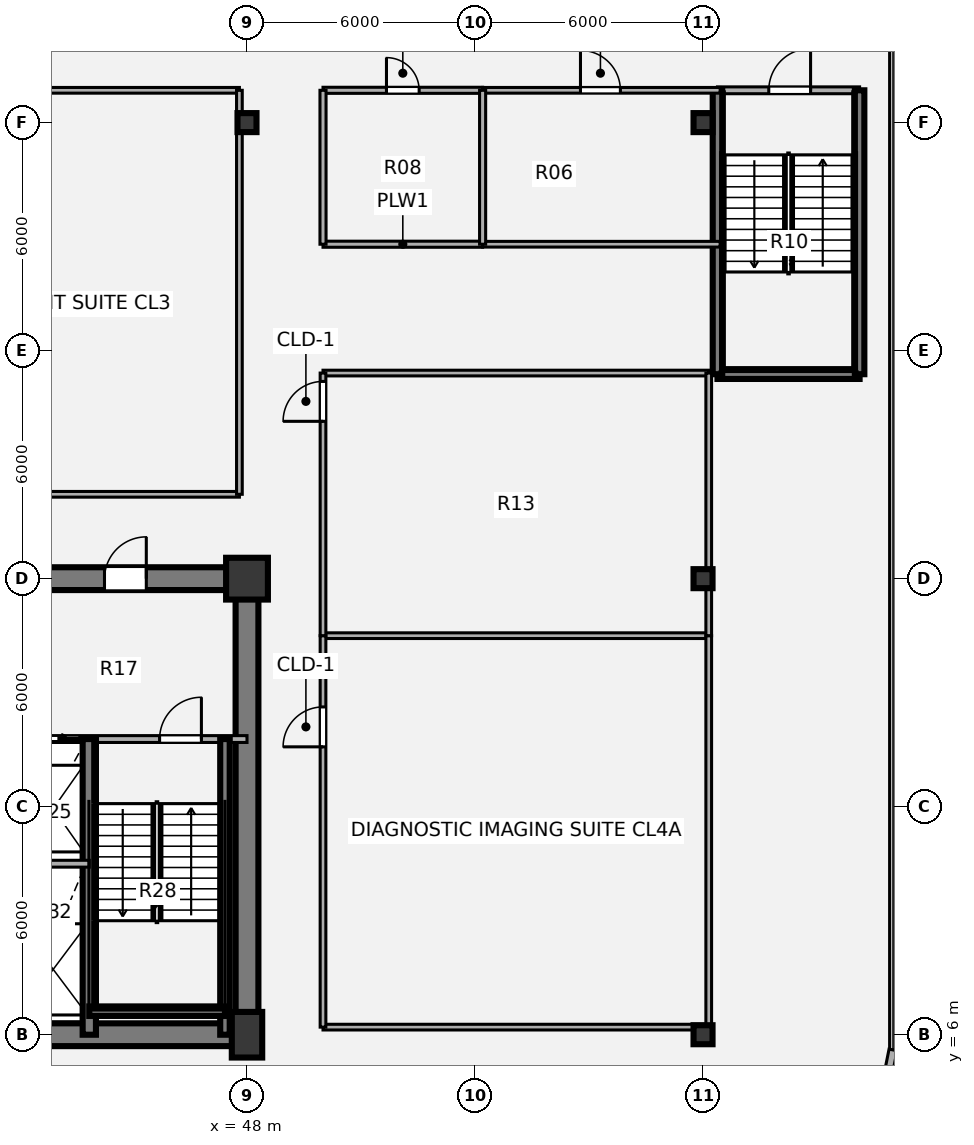
"""IFC4 building model, lengths in metres.
Left out: names, types, materials, properties, quantities, classifications, styles, units other than length and angle.
Written with IfcOpenShell. Run it as: python <this file> out.ifc"""

import sys

from ifc_helpers import new_model, si_unit, direction, frame, frame_2d, origin, origin_2d, place, context, subcontext, project, spatial, rectangle, i_section, extrude, source, transform, mapped, element, fill, save


model = new_model("IFC4")
c1 = context("Model", 3, precision=1e-05, world=origin(), true_north=direction((0.0, 1.0)))
c2 = subcontext(c1, "Body", "Model", "MODEL_VIEW")
j1 = project(units=[si_unit("LENGTHUNIT", "METRE"), si_unit("PLANEANGLEUNIT", "RADIAN")], contexts=[c1])
p1 = place(None, origin())
s1 = spatial("IfcSite", under=j1, at=p1, CompositionType="ELEMENT")
p2 = place(p1, origin())
s2 = spatial("IfcBuilding", under=s1, at=p2, CompositionType="ELEMENT")
p3 = place(p2, frame((0.0, 0.0, 9.72)))
s3 = spatial("IfcBuildingStorey", under=s2, at=p3, CompositionType="ELEMENT", Elevation=9.72)
m1 = source(origin(), c2, "Body", "SweptSolid", [
    extrude(rectangle(XDim=0.8, YDim=1.2, at=origin_2d()), origin(), (0.0, 0.0, 1.0), 4.32),
])
p4 = place(p3, frame((48.0, 6.0, 0.0), z_axis=(0.0, 0.0, 1.0), x_axis=(1.0, 0.0, 0.0)))
e1 = element("IfcColumn", 1, at=p4, inside=s3, PredefinedType="COLUMN", context=c2, shape_type="MappedRepresentation", body=[
    mapped(m1, transform((0.0, 0.0, 0.0), x_axis=(1.0, 0.0, 0.0), y_axis=(0.0, 1.0, 0.0), z_axis=(0.0, 0.0, 1.0), scale=1.0)),
])
m2 = source(origin(), c2, "Body", "SweptSolid", [
    extrude(rectangle(XDim=1.1, YDim=1.1, at=origin_2d()), origin(), (0.0, 0.0, 1.0), 4.32),
])
p5 = place(p3, frame((48.0, 18.0, 0.0), z_axis=(0.0, 0.0, 1.0), x_axis=(1.0, 0.0, 0.0)))
e2 = element("IfcColumn", 2, at=p5, inside=s3, PredefinedType="COLUMN", context=c2, shape_type="MappedRepresentation", body=[
    mapped(m2, transform((0.0, 0.0, 0.0), x_axis=(1.0, 0.0, 0.0), y_axis=(0.0, 1.0, 0.0), z_axis=(0.0, 0.0, 1.0), scale=1.0)),
])
p6 = place(p3, frame((48.3, 6.0, 0.0), z_axis=(0.0, 0.0, 1.0), x_axis=(-1.0, 0.0, 0.0)))
e3 = element("IfcWall", 3, at=p6, inside=s3, PredefinedType="SHEAR", context=c2, shape_type="SweptSolid", body=[
    extrude(rectangle(XDim=24.6, YDim=0.6, at=frame_2d((12.3, 0.0))), origin(), (0.0, 0.0, 1.0), 4.32),
])
p7 = place(p3, frame((48.0, 18.0, 0.0), z_axis=(0.0, 0.0, 1.0), x_axis=(0.0, -1.0, 0.0)))
e4 = element("IfcWall", 4, at=p7, inside=s3, PredefinedType="SHEAR", context=c2, shape_type="SweptSolid", body=[
    extrude(rectangle(XDim=12.0, YDim=0.6, at=frame_2d((6.0, 0.0))), origin(), (0.0, 0.0, 1.0), 4.32),
])
p8 = place(p3, frame((38.8, 18.0, 0.0), z_axis=(0.0, 0.0, 1.0), x_axis=(1.0, 0.0, 0.0)))
e5 = element("IfcWall", 5, at=p8, inside=s3, PredefinedType="SHEAR", context=c2, shape_type="SweptSolid", body=[
    extrude(rectangle(XDim=9.5, YDim=0.6, at=frame_2d((4.75, 0.0))), origin(), (0.0, 0.0, 1.0), 4.32),
])
p9 = place(p8, frame((5.45, 0.0, 0.0)))
e6 = element("IfcOpeningElement", 6, at=p9, cuts=e5, PredefinedType="OPENING", context=c2, shape_type="SweptSolid", body=[
    extrude(rectangle(XDim=1.1, YDim=2.1, at=origin_2d()), frame((0.55, 0.31, 1.05), z_axis=(0.0, -1.0, 0.0), x_axis=(1.0, 0.0, 0.0)), (0.0, 0.0, 1.0), 0.62),
])
m3 = source(origin(), c2, "Body", "SweptSolid", [
    extrude(i_section(OverallWidth=0.5, OverallDepth=0.5, WebThickness=0.022, FlangeThickness=0.035, at=origin_2d()), origin(), (0.0, 0.0, 1.0), 4.32),
])
for number, where, z_axis, x_axis in (
    (7, (60.0, 6.0, 0.0), (0.0, 0.0, 1.0), (1.0, 0.0, 0.0)),
    (8, (60.0, 18.0, 0.0), (0.0, 0.0, 1.0), (1.0, 0.0, 0.0)),
    (9, (48.0, 30.0, 0.0), (0.0, 0.0, 1.0), (1.0, 0.0, 0.0)),
    (10, (60.0, 30.0, 0.0), (0.0, 0.0, 1.0), (1.0, 0.0, 0.0)),
):
    element("IfcColumn", number, at=place(p3, frame(where, z_axis=z_axis, x_axis=x_axis)), inside=s3, PredefinedType="COLUMN", context=c2, shape_type="MappedRepresentation", body=[
        mapped(m3, transform((0.0, 0.0, 0.0), x_axis=(1.0, 0.0, 0.0), y_axis=(0.0, 1.0, 0.0), z_axis=(0.0, 0.0, 1.0), scale=1.0)),
    ])
p10 = place(p3, frame((65.0, 5.6, 0.0), z_axis=(0.0, 0.0, 1.0), x_axis=(-0.195138390419, -0.980775717779, 0.0)))
e11 = element("IfcWall", 11, at=p10, inside=s3, PredefinedType="SOLIDWALL", context=c2, shape_type="SweptSolid", body=[
    extrude(rectangle(XDim=1.249, YDim=0.215, at=frame_2d((0.624, 0.0))), origin(), (0.0, 0.0, 1.0), 4.04),
])
p11 = place(p3, frame((60.38, 30.85, 0.0), z_axis=(0.0, 0.0, 1.0), x_axis=(1.0, 0.0, 0.0)))
e12 = element("IfcWall", 12, at=p11, inside=s3, PredefinedType="PARTITIONING", context=c2, shape_type="SweptSolid", body=[
    extrude(rectangle(XDim=3.74, YDim=0.18, at=frame_2d((1.87, 0.0))), origin(), (0.0, 0.0, 1.0), 4.04),
])
p12 = place(p11, frame((1.35, 0.0, 0.0)))
e13 = element("IfcOpeningElement", 13, at=p12, cuts=e12, PredefinedType="OPENING", context=c2, shape_type="SweptSolid", body=[
    extrude(rectangle(XDim=1.1, YDim=2.1, at=origin_2d()), frame((0.55, 0.1, 1.05), z_axis=(0.0, -1.0, 0.0), x_axis=(1.0, 0.0, 0.0)), (0.0, 0.0, 1.0), 0.2),
])
p13 = place(p3, frame((60.38, 23.38, 0.0), z_axis=(0.0, 0.0, 1.0), x_axis=(1.0, 0.0, 0.0)))
e14 = element("IfcWall", 14, at=p13, inside=s3, PredefinedType="SHEAR", context=c2, shape_type="SweptSolid", body=[
    extrude(rectangle(XDim=3.74, YDim=0.25, at=frame_2d((1.87, 0.0))), origin(), (0.0, 0.0, 1.0), 4.32),
])
for number, where, z_axis, x_axis in (
    (15, (60.38, 23.38, 0.0), (0.0, 0.0, 1.0), (0.0, 1.0, 0.0)),
    (16, (64.12, 23.38, 0.0), (0.0, 0.0, 1.0), (0.0, 1.0, 0.0)),
):
    element("IfcWall", number, at=place(p3, frame(where, z_axis=z_axis, x_axis=x_axis)), inside=s3, PredefinedType="SHEAR", context=c2, shape_type="SweptSolid", body=[
        extrude(rectangle(XDim=7.47, YDim=0.25, at=frame_2d((3.735, 0.0))), origin(), (0.0, 0.0, 1.0), 4.32),
    ])
p14 = place(p3, frame((41.9, 13.78, 0.0), z_axis=(0.0, 0.0, 1.0), x_axis=(1.0, 0.0, 0.0)))
e17 = element("IfcWall", 17, at=p14, inside=s3, PredefinedType="PARTITIONING", context=c2, shape_type="SweptSolid", body=[
    extrude(rectangle(XDim=6.1, YDim=0.18, at=frame_2d((3.05, 0.0))), origin(), (0.0, 0.0, 1.0), 4.01),
])
p15 = place(p14, frame((0.6, 0.0, 0.0)))
e18 = element("IfcOpeningElement", 18, at=p15, cuts=e17, PredefinedType="OPENING", context=c2, shape_type="SweptSolid", body=[
    extrude(rectangle(XDim=1.1, YDim=2.1, at=origin_2d()), frame((0.55, 0.1, 1.05), z_axis=(0.0, -1.0, 0.0), x_axis=(1.0, 0.0, 0.0)), (0.0, 0.0, 1.0), 0.2),
])
p16 = place(p14, frame((3.8, 0.0, 0.0)))
e19 = element("IfcOpeningElement", 19, at=p16, cuts=e17, PredefinedType="OPENING", context=c2, shape_type="SweptSolid", body=[
    extrude(rectangle(XDim=1.1, YDim=2.1, at=origin_2d()), frame((0.55, 0.1, 1.05), z_axis=(0.0, -1.0, 0.0), x_axis=(1.0, 0.0, 0.0)), (0.0, 0.0, 1.0), 0.2),
])
p17 = place(p3, frame((43.85, 6.0, 0.0), z_axis=(0.0, 0.0, 1.0), x_axis=(0.0, 1.0, 0.0)))
e20 = element("IfcWall", 20, at=p17, inside=s3, PredefinedType="SHEAR", context=c2, shape_type="SweptSolid", body=[
    extrude(rectangle(XDim=7.78, YDim=0.35, at=frame_2d((3.89, 0.0))), origin(), (0.0, 0.0, 1.0), 4.36),
])
p18 = place(p3, frame((47.42, 6.0, 0.0), z_axis=(0.0, 0.0, 1.0), x_axis=(0.0, 1.0, 0.0)))
e21 = element("IfcWall", 21, at=p18, inside=s3, PredefinedType="SHEAR", context=c2, shape_type="SweptSolid", body=[
    extrude(rectangle(XDim=7.78, YDim=0.25, at=frame_2d((3.89, 0.0))), origin(), (0.0, 0.0, 1.0), 4.36),
])
p19 = place(p3, frame((43.85, 6.62, 0.0), z_axis=(0.0, 0.0, 1.0), x_axis=(1.0, 0.0, 0.0)))
e22 = element("IfcWall", 22, at=p19, inside=s3, PredefinedType="SHEAR", context=c2, shape_type="SweptSolid", body=[
    extrude(rectangle(XDim=3.57, YDim=0.25, at=frame_2d((1.785, 0.0))), origin(), (0.0, 0.0, 1.0), 4.36),
])
p20 = place(p3, frame((41.9, 10.5, 0.0), z_axis=(0.0, 0.0, 1.0), x_axis=(1.0, 0.0, 0.0)))
e23 = element("IfcWall", 23, at=p20, inside=s3, PredefinedType="PARTITIONING", context=c2, shape_type="SweptSolid", body=[
    extrude(rectangle(XDim=1.95, YDim=0.18, at=frame_2d((0.975, 0.0))), origin(), (0.0, 0.0, 1.0), 4.01),
])
p21 = place(p3, frame((50.0, 6.2, 0.0), z_axis=(0.0, 0.0, 1.0), x_axis=(1.0, 0.0, 0.0)))
e24 = element("IfcWall", 24, at=p21, inside=s3, PredefinedType="PARTITIONING", context=c2, shape_type="SweptSolid", body=[
    extrude(rectangle(XDim=10.15, YDim=0.15, at=frame_2d((5.075, 0.0))), origin(), (0.0, 0.0, 1.0), 3.325),
])
p22 = place(p3, frame((50.0, 16.5, 0.0), z_axis=(0.0, 0.0, 1.0), x_axis=(1.0, 0.0, 0.0)))
e25 = element("IfcWall", 25, at=p22, inside=s3, PredefinedType="PARTITIONING", context=c2, shape_type="SweptSolid", body=[
    extrude(rectangle(XDim=10.15, YDim=0.15, at=frame_2d((5.075, 0.0))), origin(), (0.0, 0.0, 1.0), 4.01),
])
p23 = place(p3, frame((36.0, 20.22, 0.0), z_axis=(0.0, 0.0, 1.0), x_axis=(1.0, 0.0, 0.0)))
e26 = element("IfcWall", 26, at=p23, inside=s3, PredefinedType="PARTITIONING", context=c2, shape_type="SweptSolid", body=[
    extrude(rectangle(XDim=11.8, YDim=0.15, at=frame_2d((5.9, 0.0))), origin(), (0.0, 0.0, 1.0), 4.01),
])
p24 = place(p3, frame((50.0, 23.41, 0.0), z_axis=(0.0, 0.0, 1.0), x_axis=(1.0, 0.0, 0.0)))
e27 = element("IfcWall", 27, at=p24, inside=s3, PredefinedType="PARTITIONING", context=c2, shape_type="SweptSolid", body=[
    extrude(rectangle(XDim=10.15, YDim=0.15, at=frame_2d((5.075, 0.0))), origin(), (0.0, 0.0, 1.0), 4.01),
])
p25 = place(p3, frame((50.0, 26.8, 0.0), z_axis=(0.0, 0.0, 1.0), x_axis=(1.0, 0.0, 0.0)))
e28 = element("IfcWall", 28, at=p25, inside=s3, PredefinedType="PLUMBINGWALL", context=c2, shape_type="SweptSolid", body=[
    extrude(rectangle(XDim=4.2, YDim=0.16, at=frame_2d((2.1, 0.0))), origin(), (0.0, 0.0, 1.0), 4.01),
])
p26 = place(p3, frame((54.2, 26.8, 0.0), z_axis=(0.0, 0.0, 1.0), x_axis=(1.0, 0.0, 0.0)))
e29 = element("IfcWall", 29, at=p26, inside=s3, PredefinedType="PARTITIONING", context=c2, shape_type="SweptSolid", body=[
    extrude(rectangle(XDim=6.25, YDim=0.15, at=frame_2d((3.125, 0.0))), origin(), (0.0, 0.0, 1.0), 4.01),
])
p27 = place(p3, frame((36.0, 30.85, 0.0), z_axis=(0.0, 0.0, 1.0), x_axis=(1.0, 0.0, 0.0)))
e30 = element("IfcWall", 30, at=p27, inside=s3, PredefinedType="PARTITIONING", context=c2, shape_type="SweptSolid", body=[
    extrude(rectangle(XDim=11.8, YDim=0.15, at=frame_2d((5.9, 0.0))), origin(), (0.0, 0.0, 1.0), 4.01),
])
p28 = place(p27, frame((5.475, 0.0, 0.0)))
e31 = element("IfcOpeningElement", 31, at=p28, cuts=e30, PredefinedType="OPENING", context=c2, shape_type="SweptSolid", body=[
    extrude(rectangle(XDim=1.05, YDim=2.1, at=origin_2d()), frame((0.525, 0.085, 1.05), z_axis=(0.0, -1.0, 0.0), x_axis=(1.0, 0.0, 0.0)), (0.0, 0.0, 1.0), 0.17),
])
p29 = place(p3, frame((50.0, 30.85, 0.0), z_axis=(0.0, 0.0, 1.0), x_axis=(1.0, 0.0, 0.0)))
e32 = element("IfcWall", 32, at=p29, inside=s3, PredefinedType="PLUMBINGWALL", context=c2, shape_type="SweptSolid", body=[
    extrude(rectangle(XDim=4.2, YDim=0.16, at=frame_2d((2.1, 0.0))), origin(), (0.0, 0.0, 1.0), 4.01),
])
p30 = place(p29, frame((1.67, 0.0, 0.0)))
e33 = element("IfcOpeningElement", 33, at=p30, cuts=e32, PredefinedType="OPENING", context=c2, shape_type="SweptSolid", body=[
    extrude(rectangle(XDim=0.86, YDim=2.1, at=origin_2d()), frame((0.43, 0.09, 1.05), z_axis=(0.0, -1.0, 0.0), x_axis=(1.0, 0.0, 0.0)), (0.0, 0.0, 1.0), 0.18),
])
p31 = place(p3, frame((54.2, 30.85, 0.0), z_axis=(0.0, 0.0, 1.0), x_axis=(1.0, 0.0, 0.0)))
e34 = element("IfcWall", 34, at=p31, inside=s3, PredefinedType="PARTITIONING", context=c2, shape_type="SweptSolid", body=[
    extrude(rectangle(XDim=6.25, YDim=0.15, at=frame_2d((3.125, 0.0))), origin(), (0.0, 0.0, 1.0), 4.01),
])
p32 = place(p31, frame((2.575, 0.0, 0.0)))
e35 = element("IfcOpeningElement", 35, at=p32, cuts=e34, PredefinedType="OPENING", context=c2, shape_type="SweptSolid", body=[
    extrude(rectangle(XDim=1.05, YDim=2.1, at=origin_2d()), frame((0.525, 0.085, 1.05), z_axis=(0.0, -1.0, 0.0), x_axis=(1.0, 0.0, 0.0)), (0.0, 0.0, 1.0), 0.17),
])
p33 = place(p3, frame((47.8, 20.22, 0.0), z_axis=(0.0, 0.0, 1.0), x_axis=(0.0, 1.0, 0.0)))
e36 = element("IfcWall", 36, at=p33, inside=s3, PredefinedType="PARTITIONING", context=c2, shape_type="SweptSolid", body=[
    extrude(rectangle(XDim=10.63, YDim=0.15, at=frame_2d((5.315, 0.0))), origin(), (0.0, 0.0, 1.0), 3.225),
])
p34 = place(p3, frame((50.0, 6.2, 0.0), z_axis=(0.0, 0.0, 1.0), x_axis=(0.0, 1.0, 0.0)))
e37 = element("IfcWall", 37, at=p34, inside=s3, PredefinedType="PARTITIONING", context=c2, shape_type="SweptSolid", body=[
    extrude(rectangle(XDim=10.3, YDim=0.15, at=frame_2d((5.15, 0.0))), origin(), (0.0, 0.0, 1.0), 3.718),
])
p35 = place(p34, frame((7.375, 0.0, 0.0)))
e38 = element("IfcOpeningElement", 38, at=p35, cuts=e37, PredefinedType="OPENING", context=c2, shape_type="SweptSolid", body=[
    extrude(rectangle(XDim=1.05, YDim=2.1, at=origin_2d()), frame((0.525, 0.085, 1.05), z_axis=(0.0, -1.0, 0.0), x_axis=(1.0, 0.0, 0.0)), (0.0, 0.0, 1.0), 0.17),
])
p36 = place(p3, frame((50.0, 16.5, 0.0), z_axis=(0.0, 0.0, 1.0), x_axis=(0.0, 1.0, 0.0)))
e39 = element("IfcWall", 39, at=p36, inside=s3, PredefinedType="PARTITIONING", context=c2, shape_type="SweptSolid", body=[
    extrude(rectangle(XDim=6.91, YDim=0.15, at=frame_2d((3.455, 0.0))), origin(), (0.0, 0.0, 1.0), 3.718),
])
p37 = place(p36, frame((5.64, 0.0, 0.0)))
e40 = element("IfcOpeningElement", 40, at=p37, cuts=e39, PredefinedType="OPENING", context=c2, shape_type="SweptSolid", body=[
    extrude(rectangle(XDim=1.05, YDim=2.1, at=origin_2d()), frame((0.525, 0.085, 1.05), z_axis=(0.0, -1.0, 0.0), x_axis=(1.0, 0.0, 0.0)), (0.0, 0.0, 1.0), 0.17),
])
for number, where, z_axis, x_axis in (
    (41, (50.0, 26.8, 0.0), (0.0, 0.0, 1.0), (0.0, 1.0, 0.0)),
    (42, (54.2, 26.8, 0.0), (0.0, 0.0, 1.0), (0.0, 1.0, 0.0)),
):
    element("IfcWall", number, at=place(p3, frame(where, z_axis=z_axis, x_axis=x_axis)), inside=s3, PredefinedType="PLUMBINGWALL", context=c2, shape_type="SweptSolid", body=[
        extrude(rectangle(XDim=4.05, YDim=0.16, at=frame_2d((2.025, 0.0))), origin(), (0.0, 0.0, 1.0), 3.666),
    ])
p38 = place(p3, frame((60.15, 6.2, 0.0), z_axis=(0.0, 0.0, 1.0), x_axis=(0.0, 1.0, 0.0)))
e43 = element("IfcWall", 43, at=p38, inside=s3, PredefinedType="PARTITIONING", context=c2, shape_type="SweptSolid", body=[
    extrude(rectangle(XDim=10.3, YDim=0.15, at=frame_2d((5.15, 0.0))), origin(), (0.0, 0.0, 1.0), 3.225),
])
p39 = place(p3, frame((60.15, 16.5, 0.0), z_axis=(0.0, 0.0, 1.0), x_axis=(0.0, 1.0, 0.0)))
e44 = element("IfcWall", 44, at=p39, inside=s3, PredefinedType="PARTITIONING", context=c2, shape_type="SweptSolid", body=[
    extrude(rectangle(XDim=6.91, YDim=0.15, at=frame_2d((3.455, 0.0))), origin(), (0.0, 0.0, 1.0), 3.225),
])
m4 = source(origin(), c2, "Body", "SweptSolid", [
    extrude(rectangle(XDim=1.1, YDim=2.1, at=origin_2d()), frame((0.55, 0.025, 1.05), z_axis=(0.0, -1.0, 0.0), x_axis=(1.0, 0.0, 0.0)), (0.0, 0.0, 1.0), 0.05),
])
p40 = place(p12, origin())
e45 = element("IfcDoor", 45, at=p40, inside=s3, OperationType="SINGLE_SWING_RIGHT", PredefinedType="DOOR", context=c2, shape_type="MappedRepresentation", body=[
    mapped(m4, transform((0.0, 0.0, 0.0), x_axis=(1.0, 0.0, 0.0), y_axis=(0.0, 1.0, 0.0), z_axis=(0.0, 0.0, 1.0), scale=1.0)),
])
fill(e13, e45)
m5 = source(origin(), c2, "Body", "SweptSolid", [
    extrude(rectangle(XDim=1.1, YDim=2.1, at=origin_2d()), frame((0.55, 0.025, 1.05), z_axis=(0.0, -1.0, 0.0), x_axis=(1.0, 0.0, 0.0)), (0.0, 0.0, 1.0), 0.05),
])
p41 = place(p15, origin())
e46 = element("IfcDoor", 46, at=p41, inside=s3, OperationType="SLIDING_TO_RIGHT", PredefinedType="DOOR", context=c2, shape_type="MappedRepresentation", body=[
    mapped(m5, transform((0.0, 0.0, 0.0), x_axis=(1.0, 0.0, 0.0), y_axis=(0.0, 1.0, 0.0), z_axis=(0.0, 0.0, 1.0), scale=1.0)),
])
fill(e18, e46)
p42 = place(p16, origin())
e47 = element("IfcDoor", 47, at=p42, inside=s3, OperationType="SINGLE_SWING_RIGHT", PredefinedType="DOOR", context=c2, shape_type="MappedRepresentation", body=[
    mapped(m4, transform((0.0, 0.0, 0.0), x_axis=(1.0, 0.0, 0.0), y_axis=(0.0, 1.0, 0.0), z_axis=(0.0, 0.0, 1.0), scale=1.0)),
])
fill(e19, e47)
m6 = source(origin(), c2, "Body", "SweptSolid", [
    extrude(rectangle(XDim=1.1, YDim=2.1, at=origin_2d()), frame((0.55, 0.025, 1.05), z_axis=(0.0, -1.0, 0.0), x_axis=(1.0, 0.0, 0.0)), (0.0, 0.0, 1.0), 0.05),
])
p43 = place(p9, origin())
e48 = element("IfcDoor", 48, at=p43, inside=s3, OperationType="SINGLE_SWING_RIGHT", PredefinedType="DOOR", context=c2, shape_type="MappedRepresentation", body=[
    mapped(m6, transform((0.0, 0.0, 0.0), x_axis=(1.0, 0.0, 0.0), y_axis=(0.0, 1.0, 0.0), z_axis=(0.0, 0.0, 1.0), scale=1.0)),
])
fill(e6, e48)
m7 = source(origin(), c2, "Body", "SweptSolid", [
    extrude(rectangle(XDim=0.86, YDim=2.1, at=origin_2d()), frame((0.43, 0.025, 1.05), z_axis=(0.0, -1.0, 0.0), x_axis=(1.0, 0.0, 0.0)), (0.0, 0.0, 1.0), 0.05),
])
p44 = place(p30, origin())
e49 = element("IfcDoor", 49, at=p44, inside=s3, OperationType="SINGLE_SWING_LEFT", PredefinedType="DOOR", context=c2, shape_type="MappedRepresentation", body=[
    mapped(m7, transform((0.0, 0.0, 0.0), x_axis=(1.0, 0.0, 0.0), y_axis=(0.0, 1.0, 0.0), z_axis=(0.0, 0.0, 1.0), scale=1.0)),
])
fill(e33, e49)
m8 = source(origin(), c2, "Body", "SweptSolid", [
    extrude(rectangle(XDim=1.05, YDim=2.1, at=origin_2d()), frame((0.525, 0.025, 1.05), z_axis=(0.0, -1.0, 0.0), x_axis=(1.0, 0.0, 0.0)), (0.0, 0.0, 1.0), 0.05),
])
p45 = place(p32, origin())
e50 = element("IfcDoor", 50, at=p45, inside=s3, OperationType="SINGLE_SWING_LEFT", PredefinedType="DOOR", context=c2, shape_type="MappedRepresentation", body=[
    mapped(m8, transform((0.0, 0.0, 0.0), x_axis=(1.0, 0.0, 0.0), y_axis=(0.0, 1.0, 0.0), z_axis=(0.0, 0.0, 1.0), scale=1.0)),
])
fill(e35, e50)
p46 = place(p35, origin())
e51 = element("IfcDoor", 51, at=p46, inside=s3, OperationType="SINGLE_SWING_LEFT", PredefinedType="DOOR", context=c2, shape_type="MappedRepresentation", body=[
    mapped(m8, transform((0.0, 0.0, 0.0), x_axis=(1.0, 0.0, 0.0), y_axis=(0.0, 1.0, 0.0), z_axis=(0.0, 0.0, 1.0), scale=1.0)),
])
fill(e38, e51)
p47 = place(p37, origin())
e52 = element("IfcDoor", 52, at=p47, inside=s3, OperationType="SINGLE_SWING_LEFT", PredefinedType="DOOR", context=c2, shape_type="MappedRepresentation", body=[
    mapped(m8, transform((0.0, 0.0, 0.0), x_axis=(1.0, 0.0, 0.0), y_axis=(0.0, 1.0, 0.0), z_axis=(0.0, 0.0, 1.0), scale=1.0)),
])
fill(e40, e52)
save(model, sys.argv[1])
